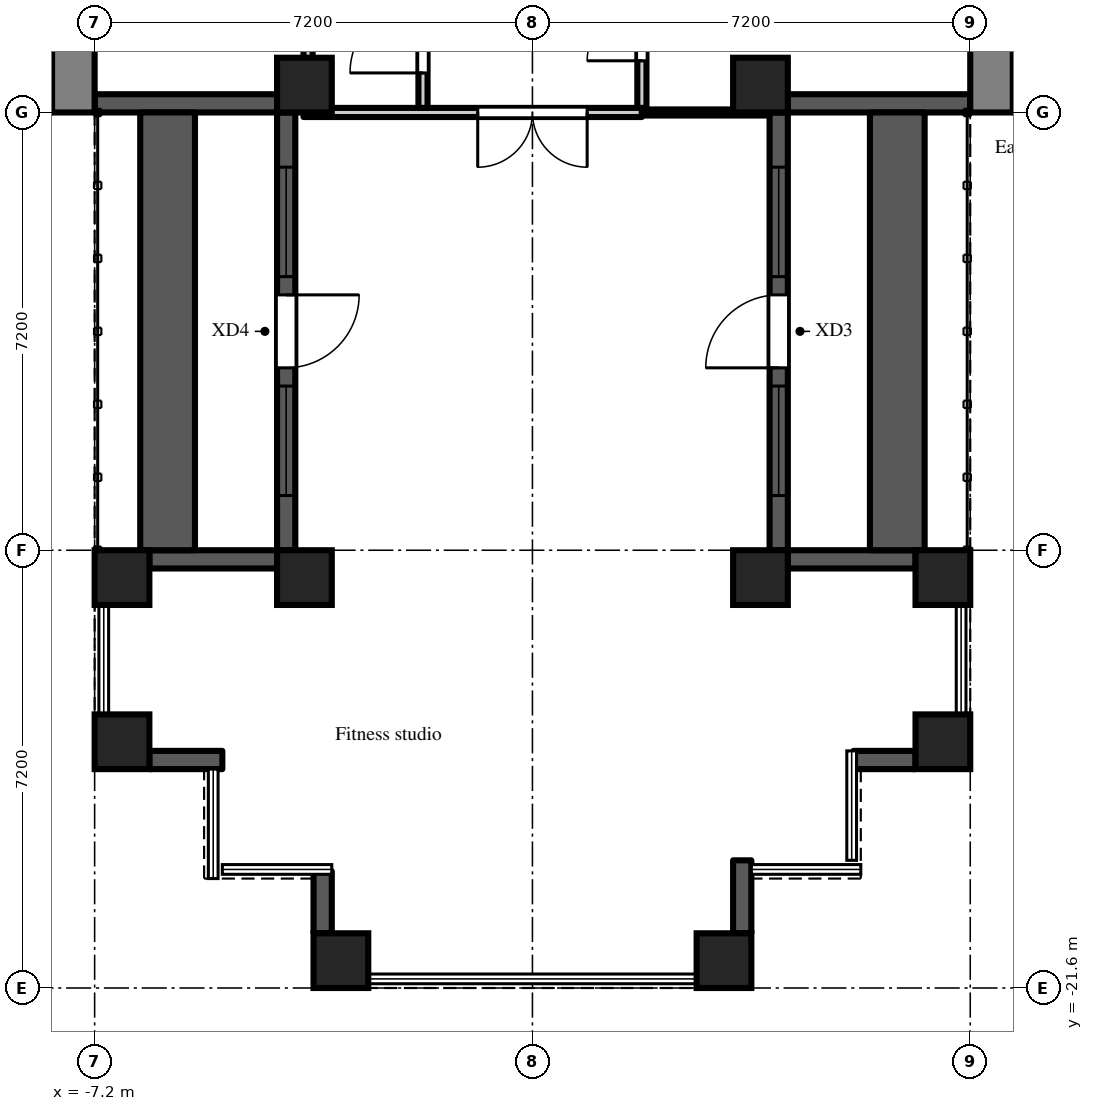
"""IFC4 building model, lengths in metres.
Left out: names, types, materials, properties, quantities, classifications, styles, units other than length and angle.
Written with IfcOpenShell. Run it as: python <this file> out.ifc"""

import sys

from ifc_helpers import new_model, si_unit, direction, frame, frame_2d, origin, origin_2d, place, context, subcontext, project, spatial, rectangle, extrude, element, fill, save


model = new_model("IFC4")
c1 = context("Model", 3, precision=1e-05, world=origin(), true_north=direction((0.0, 1.0)))
c2 = subcontext(c1, "Body", "Model", "MODEL_VIEW")
j1 = project(units=[si_unit("LENGTHUNIT", "METRE"), si_unit("PLANEANGLEUNIT", "RADIAN")], contexts=[c1])
p1 = place(None, origin())
s1 = spatial("IfcSite", under=j1, at=p1, CompositionType="ELEMENT")
p2 = place(p1, origin())
s2 = spatial("IfcBuilding", under=s1, at=p2, CompositionType="ELEMENT")
p3 = place(p2, frame((0.0, 0.0, 166.5)))
s3 = spatial("IfcBuildingStorey", under=s2, at=p3, CompositionType="ELEMENT", Elevation=166.5)
for number, where, z_axis, x_axis in (
    (1, (-6.75, -17.55, 0.0), (0.0, 0.0, 1.0), (1.0, 0.0, 0.0)),
    (2, (-6.75, -14.85, 0.0), (0.0, 0.0, 1.0), (1.0, 0.0, 0.0)),
    (3, (-3.75, -14.85, 0.0), (0.0, 0.0, 1.0), (1.0, 0.0, 0.0)),
    (4, (-3.75, -6.75, 0.0), (0.0, 0.0, 1.0), (1.0, 0.0, 0.0)),
    (5, (-3.15, -21.15, 0.0), (0.0, 0.0, 1.0), (1.0, 0.0, 0.0)),
    (6, (3.15, -21.15, 0.0), (0.0, 0.0, 1.0), (1.0, 0.0, 0.0)),
    (7, (3.75, -14.85, 0.0), (0.0, 0.0, 1.0), (1.0, 0.0, 0.0)),
    (8, (3.75, -6.75, 0.0), (0.0, 0.0, 1.0), (1.0, 0.0, 0.0)),
    (9, (6.75, -17.55, 0.0), (0.0, 0.0, 1.0), (1.0, 0.0, 0.0)),
    (10, (6.75, -14.85, 0.0), (0.0, 0.0, 1.0), (1.0, 0.0, 0.0)),
):
    element("IfcColumn", number, at=place(p3, frame(where, z_axis=z_axis, x_axis=x_axis)), inside=s3, PredefinedType="COLUMN", context=c2, shape_type="SweptSolid", body=[
        extrude(rectangle(XDim=0.9, YDim=0.9, at=origin_2d()), origin(), (0.0, 0.0, 1.0), 4.2),
    ])
p4 = place(p3, frame((-7.2, -7.05, 0.0), z_axis=(0.0, 0.0, 1.0), x_axis=(1.0, 0.0, 0.0)))
e11 = element("IfcWall", 11, at=p4, inside=s3, PredefinedType="SOLIDWALL", context=c2, shape_type="SweptSolid", body=[
    extrude(rectangle(XDim=3.0, YDim=0.3, at=frame_2d((1.5, 0.0))), origin(), (0.0, 0.0, 1.0), 3.4),
])
p5 = place(p3, frame((-4.05, -7.2, 0.0), z_axis=(0.0, 0.0, 1.0), x_axis=(0.0, -1.0, 0.0)))
e12 = element("IfcWall", 12, at=p5, inside=s3, PredefinedType="SOLIDWALL", context=c2, shape_type="SweptSolid", body=[
    extrude(rectangle(XDim=7.2, YDim=0.3, at=frame_2d((3.6, 0.0))), origin(), (0.0, 0.0, 1.0), 3.4),
])
p6 = place(p5, frame((3.0, 0.0, 0.0)))
e13 = element("IfcOpeningElement", 13, at=p6, cuts=e12, PredefinedType="OPENING", context=c2, shape_type="SweptSolid", body=[
    extrude(rectangle(XDim=1.2, YDim=2.05, at=frame_2d((0.6, 1.025))), frame((0.0, 0.16, 0.0), z_axis=(0.0, -1.0, 0.0), x_axis=(1.0, 0.0, 0.0)), (0.0, 0.0, 1.0), 0.32),
])
p7 = place(p5, frame((0.9, 0.0, 0.2)))
e14 = element("IfcOpeningElement", 14, at=p7, cuts=e12, PredefinedType="OPENING", context=c2, shape_type="SweptSolid", body=[
    extrude(rectangle(XDim=1.8, YDim=1.85, at=frame_2d((0.9, 0.925))), frame((0.0, 0.16, 0.0), z_axis=(0.0, -1.0, 0.0), x_axis=(1.0, 0.0, 0.0)), (0.0, 0.0, 1.0), 0.32),
])
p8 = place(p5, frame((4.5, 0.0, 0.2)))
e15 = element("IfcOpeningElement", 15, at=p8, cuts=e12, PredefinedType="OPENING", context=c2, shape_type="SweptSolid", body=[
    extrude(rectangle(XDim=1.8, YDim=1.85, at=frame_2d((0.9, 0.925))), frame((0.0, 0.16, 0.0), z_axis=(0.0, -1.0, 0.0), x_axis=(1.0, 0.0, 0.0)), (0.0, 0.0, 1.0), 0.32),
])
p9 = place(p3, frame((-4.2, -14.55, 0.0), z_axis=(0.0, 0.0, 1.0), x_axis=(-1.0, 0.0, 0.0)))
e16 = element("IfcWall", 16, at=p9, inside=s3, PredefinedType="SOLIDWALL", context=c2, shape_type="SweptSolid", body=[
    extrude(rectangle(XDim=2.1, YDim=0.3, at=frame_2d((1.05, 0.0))), origin(), (0.0, 0.0, 1.0), 3.4),
])
p10 = place(p3, frame((-6.3, -17.85, 0.0), z_axis=(0.0, 0.0, 1.0), x_axis=(1.0, 0.0, 0.0)))
e17 = element("IfcWall", 17, at=p10, inside=s3, PredefinedType="SOLIDWALL", context=c2, shape_type="SweptSolid", body=[
    extrude(rectangle(XDim=1.2, YDim=0.3, at=frame_2d((0.6, 0.0))), origin(), (0.0, 0.0, 1.0), 3.8),
])
p11 = place(p3, frame((-3.45, -19.68, 0.0), z_axis=(0.0, 0.0, 1.0), x_axis=(0.0, -1.0, 0.0)))
e18 = element("IfcWall", 18, at=p11, inside=s3, PredefinedType="SOLIDWALL", context=c2, shape_type="SweptSolid", body=[
    extrude(rectangle(XDim=1.02, YDim=0.3, at=frame_2d((0.51, 0.0))), origin(), (0.0, 0.0, 1.0), 3.8),
])
p12 = place(p3, frame((3.45, -20.7, 0.0), z_axis=(0.0, 0.0, 1.0), x_axis=(0.0, 1.0, 0.0)))
e19 = element("IfcWall", 19, at=p12, inside=s3, PredefinedType="SOLIDWALL", context=c2, shape_type="SweptSolid", body=[
    extrude(rectangle(XDim=1.2, YDim=0.3, at=frame_2d((0.6, 0.0))), origin(), (0.0, 0.0, 1.0), 3.8),
])
p13 = place(p3, frame((5.28, -17.85, 0.0), z_axis=(0.0, 0.0, 1.0), x_axis=(1.0, 0.0, 0.0)))
e20 = element("IfcWall", 20, at=p13, inside=s3, PredefinedType="SOLIDWALL", context=c2, shape_type="SweptSolid", body=[
    extrude(rectangle(XDim=1.02, YDim=0.3, at=frame_2d((0.51, 0.0))), origin(), (0.0, 0.0, 1.0), 3.8),
])
p14 = place(p3, frame((6.3, -14.55, 0.0), z_axis=(0.0, 0.0, 1.0), x_axis=(-1.0, 0.0, 0.0)))
e21 = element("IfcWall", 21, at=p14, inside=s3, PredefinedType="SOLIDWALL", context=c2, shape_type="SweptSolid", body=[
    extrude(rectangle(XDim=2.1, YDim=0.3, at=frame_2d((1.05, 0.0))), origin(), (0.0, 0.0, 1.0), 3.4),
])
p15 = place(p3, frame((4.05, -14.4, 0.0), z_axis=(0.0, 0.0, 1.0), x_axis=(0.0, 1.0, 0.0)))
e22 = element("IfcWall", 22, at=p15, inside=s3, PredefinedType="SOLIDWALL", context=c2, shape_type="SweptSolid", body=[
    extrude(rectangle(XDim=7.2, YDim=0.3, at=frame_2d((3.6, 0.0))), origin(), (0.0, 0.0, 1.0), 3.4),
])
p16 = place(p15, frame((3.0, 0.0, 0.0)))
e23 = element("IfcOpeningElement", 23, at=p16, cuts=e22, PredefinedType="OPENING", context=c2, shape_type="SweptSolid", body=[
    extrude(rectangle(XDim=1.2, YDim=2.05, at=frame_2d((0.6, 1.025))), frame((0.0, 0.16, 0.0), z_axis=(0.0, -1.0, 0.0), x_axis=(1.0, 0.0, 0.0)), (0.0, 0.0, 1.0), 0.32),
])
p17 = place(p15, frame((0.9, 0.0, 0.2)))
e24 = element("IfcOpeningElement", 24, at=p17, cuts=e22, PredefinedType="OPENING", context=c2, shape_type="SweptSolid", body=[
    extrude(rectangle(XDim=1.8, YDim=1.85, at=frame_2d((0.9, 0.925))), frame((0.0, 0.16, 0.0), z_axis=(0.0, -1.0, 0.0), x_axis=(1.0, 0.0, 0.0)), (0.0, 0.0, 1.0), 0.32),
])
p18 = place(p15, frame((4.5, 0.0, 0.2)))
e25 = element("IfcOpeningElement", 25, at=p18, cuts=e22, PredefinedType="OPENING", context=c2, shape_type="SweptSolid", body=[
    extrude(rectangle(XDim=1.8, YDim=1.85, at=frame_2d((0.9, 0.925))), frame((0.0, 0.16, 0.0), z_axis=(0.0, -1.0, 0.0), x_axis=(1.0, 0.0, 0.0)), (0.0, 0.0, 1.0), 0.32),
])
p19 = place(p3, frame((4.2, -7.05, 0.0), z_axis=(0.0, 0.0, 1.0), x_axis=(1.0, 0.0, 0.0)))
e26 = element("IfcWall", 26, at=p19, inside=s3, PredefinedType="SOLIDWALL", context=c2, shape_type="SweptSolid", body=[
    extrude(rectangle(XDim=3.0, YDim=0.3, at=frame_2d((1.5, 0.0))), origin(), (0.0, 0.0, 1.0), 3.4),
])
for number, where, z_axis, x_axis in (
    (27, (6.0, -14.4, 0.0), (0.0, 0.0, 1.0), (0.0, 1.0, 0.0)),
    (28, (-6.0, -14.4, 0.0), (0.0, 0.0, 1.0), (0.0, 1.0, 0.0)),
):
    element("IfcWall", number, at=place(p3, frame(where, z_axis=z_axis, x_axis=x_axis)), inside=s3, PredefinedType="PARAPET", context=c2, shape_type="SweptSolid", body=[
        extrude(rectangle(XDim=7.2, YDim=0.9, at=frame_2d((3.6, 0.0))), origin(), (0.0, 0.0, 1.0), 0.8),
    ])
p20 = place(p3, frame((7.55, -7.2, 0.0), z_axis=(0.0, 0.0, 1.0), x_axis=(0.0, 1.0, 0.0)))
e29 = element("IfcWall", 29, at=p20, inside=s3, PredefinedType="SHEAR", context=c2, shape_type="SweptSolid", body=[
    extrude(rectangle(XDim=14.4, YDim=0.7, at=frame_2d((7.2, 0.0))), origin(), (0.0, 0.0, 1.0), 3.8),
])
p21 = place(p20, frame((6.0, 0.0, 0.0)))
e30 = element("IfcOpeningElement", 30, at=p21, cuts=e29, PredefinedType="OPENING", context=c2, shape_type="SweptSolid", body=[
    extrude(rectangle(XDim=2.4, YDim=2.2, at=frame_2d((1.2, 1.1))), frame((0.0, 0.36, 0.0), z_axis=(0.0, -1.0, 0.0), x_axis=(1.0, 0.0, 0.0)), (0.0, 0.0, 1.0), 0.72),
])
p22 = place(p3, frame((-7.55, -7.2, 0.0), z_axis=(0.0, 0.0, 1.0), x_axis=(0.0, 1.0, 0.0)))
e31 = element("IfcWall", 31, at=p22, inside=s3, PredefinedType="SHEAR", context=c2, shape_type="SweptSolid", body=[
    extrude(rectangle(XDim=14.4, YDim=0.7, at=frame_2d((7.2, 0.0))), origin(), (0.0, 0.0, 1.0), 3.8),
])
p23 = place(p22, frame((6.0, 0.0, 0.0)))
e32 = element("IfcOpeningElement", 32, at=p23, cuts=e31, PredefinedType="OPENING", context=c2, shape_type="SweptSolid", body=[
    extrude(rectangle(XDim=2.4, YDim=2.2, at=frame_2d((1.2, 1.1))), frame((0.0, 0.36, 0.0), z_axis=(0.0, -1.0, 0.0), x_axis=(1.0, 0.0, 0.0)), (0.0, 0.0, 1.0), 0.72),
])
p24 = place(p3, frame((-3.69, -7.125, 0.0), z_axis=(0.0, 0.0, 1.0), x_axis=(0.0, 1.0, 0.0)))
e33 = element("IfcWall", 33, at=p24, inside=s3, PredefinedType="PARTITIONING", context=c2, shape_type="SweptSolid", body=[
    extrude(rectangle(XDim=5.25, YDim=0.15, at=frame_2d((2.625, 0.0))), origin(), (0.0, 0.0, 1.0), 3.8),
])
p25 = place(p3, frame((-3.765, -7.2, 0.0), z_axis=(0.0, 0.0, 1.0), x_axis=(1.0, 0.0, 0.0)))
e34 = element("IfcWall", 34, at=p25, inside=s3, PredefinedType="PARTITIONING", context=c2, shape_type="SweptSolid", body=[
    extrude(rectangle(XDim=5.565, YDim=0.15, at=frame_2d((2.782, 0.0))), origin(), (0.0, 0.0, 1.0), 3.8),
])
p26 = place(p25, frame((2.865, 0.0, 0.0)))
e35 = element("IfcOpeningElement", 35, at=p26, cuts=e34, PredefinedType="OPENING", context=c2, shape_type="SweptSolid", body=[
    extrude(rectangle(XDim=1.8, YDim=2.1, at=frame_2d((0.9, 1.05))), frame((0.0, 0.085, 0.0), z_axis=(0.0, -1.0, 0.0), x_axis=(1.0, 0.0, 0.0)), (0.0, 0.0, 1.0), 0.17),
])
p27 = place(p3, frame((-1.8, -7.125, 0.0), z_axis=(0.0, 0.0, 1.0), x_axis=(0.0, 1.0, 0.0)))
e36 = element("IfcWall", 36, at=p27, inside=s3, PredefinedType="PARTITIONING", context=c2, shape_type="SweptSolid", body=[
    extrude(rectangle(XDim=5.4, YDim=0.15, at=frame_2d((2.7, 0.0))), origin(), (0.0, 0.0, 1.0), 3.8),
])
p28 = place(p27, frame((0.575, 0.0, 0.0)))
e37 = element("IfcOpeningElement", 37, at=p28, cuts=e36, PredefinedType="OPENING", context=c2, shape_type="SweptSolid", body=[
    extrude(rectangle(XDim=1.2, YDim=2.1, at=frame_2d((0.6, 1.05))), frame((0.0, 0.085, 0.0), z_axis=(0.0, -1.0, 0.0), x_axis=(1.0, 0.0, 0.0)), (0.0, 0.0, 1.0), 0.17),
])
p29 = place(p27, frame((3.12, 0.0, 0.0)))
e38 = element("IfcOpeningElement", 38, at=p29, cuts=e36, PredefinedType="OPENING", context=c2, shape_type="SweptSolid", body=[
    extrude(rectangle(XDim=0.9, YDim=2.1, at=frame_2d((0.45, 1.05))), frame((0.0, 0.085, 0.0), z_axis=(0.0, -1.0, 0.0), x_axis=(1.0, 0.0, 0.0)), (0.0, 0.0, 1.0), 0.17),
])
p30 = place(p3, frame((1.8, -7.125, 0.0), z_axis=(0.0, 0.0, 1.0), x_axis=(0.0, 1.0, 0.0)))
e39 = element("IfcWall", 39, at=p30, inside=s3, PredefinedType="PARTITIONING", context=c2, shape_type="SweptSolid", body=[
    extrude(rectangle(XDim=5.4, YDim=0.15, at=frame_2d((2.7, 0.0))), origin(), (0.0, 0.0, 1.0), 3.8),
])
p31 = place(p30, frame((0.775, 0.0, 0.0)))
e40 = element("IfcOpeningElement", 40, at=p31, cuts=e39, PredefinedType="OPENING", context=c2, shape_type="SweptSolid", body=[
    extrude(rectangle(XDim=1.8, YDim=2.1, at=frame_2d((0.9, 1.05))), frame((0.0, 0.085, 0.0), z_axis=(0.0, -1.0, 0.0), x_axis=(1.0, 0.0, 0.0)), (0.0, 0.0, 1.0), 0.17),
])
p32 = place(p3, frame((1.8, -7.2, 0.0), z_axis=(0.0, 0.0, 1.0), x_axis=(1.0, 0.0, 0.0)))
e41 = element("IfcWall", 41, at=p32, inside=s3, PredefinedType="PARTITIONING", context=c2, shape_type="SweptSolid", body=[
    extrude(rectangle(XDim=2.1, YDim=0.1, at=frame_2d((1.05, 0.0))), origin(), (0.0, 0.0, 1.0), 3.8),
])
p33 = place(p6, origin())
e42 = element("IfcDoor", 42, at=p33, inside=s3, OperationType="SINGLE_SWING_LEFT", PredefinedType="DOOR", context=c2, shape_type="SweptSolid", body=[
    extrude(rectangle(XDim=1.2, YDim=2.05, at=frame_2d((0.6, 1.025))), frame((0.0, 0.025, 0.0), z_axis=(0.0, -1.0, 0.0), x_axis=(1.0, 0.0, 0.0)), (0.0, 0.0, 1.0), 0.05),
])
fill(e13, e42)
p34 = place(p7, origin())
e43 = element("IfcWindow", 43, at=p34, inside=s3, PartitioningType="SINGLE_PANEL", PredefinedType="WINDOW", context=c2, shape_type="SweptSolid", body=[
    extrude(rectangle(XDim=1.8, YDim=1.85, at=frame_2d((0.9, 0.925))), frame((0.0, 0.03, 0.0), z_axis=(0.0, -1.0, 0.0), x_axis=(1.0, 0.0, 0.0)), (0.0, 0.0, 1.0), 0.06),
])
fill(e14, e43)
p35 = place(p8, origin())
e44 = element("IfcWindow", 44, at=p35, inside=s3, PartitioningType="SINGLE_PANEL", PredefinedType="WINDOW", context=c2, shape_type="SweptSolid", body=[
    extrude(rectangle(XDim=1.8, YDim=1.85, at=frame_2d((0.9, 0.925))), frame((0.0, 0.03, 0.0), z_axis=(0.0, -1.0, 0.0), x_axis=(1.0, 0.0, 0.0)), (0.0, 0.0, 1.0), 0.06),
])
fill(e15, e44)
p36 = place(p16, origin())
e45 = element("IfcDoor", 45, at=p36, inside=s3, OperationType="SINGLE_SWING_LEFT", PredefinedType="DOOR", context=c2, shape_type="SweptSolid", body=[
    extrude(rectangle(XDim=1.2, YDim=2.05, at=frame_2d((0.6, 1.025))), frame((0.0, 0.025, 0.0), z_axis=(0.0, -1.0, 0.0), x_axis=(1.0, 0.0, 0.0)), (0.0, 0.0, 1.0), 0.05),
])
fill(e23, e45)
p37 = place(p17, origin())
e46 = element("IfcWindow", 46, at=p37, inside=s3, PartitioningType="SINGLE_PANEL", PredefinedType="WINDOW", context=c2, shape_type="SweptSolid", body=[
    extrude(rectangle(XDim=1.8, YDim=1.85, at=frame_2d((0.9, 0.925))), frame((0.0, 0.03, 0.0), z_axis=(0.0, -1.0, 0.0), x_axis=(1.0, 0.0, 0.0)), (0.0, 0.0, 1.0), 0.06),
])
fill(e24, e46)
p38 = place(p18, origin())
e47 = element("IfcWindow", 47, at=p38, inside=s3, PartitioningType="SINGLE_PANEL", PredefinedType="WINDOW", context=c2, shape_type="SweptSolid", body=[
    extrude(rectangle(XDim=1.8, YDim=1.85, at=frame_2d((0.9, 0.925))), frame((0.0, 0.03, 0.0), z_axis=(0.0, -1.0, 0.0), x_axis=(1.0, 0.0, 0.0)), (0.0, 0.0, 1.0), 0.06),
])
fill(e25, e47)
p39 = place(p28, origin())
e48 = element("IfcDoor", 48, at=p39, inside=s3, OperationType="SINGLE_SWING_LEFT", PredefinedType="DOOR", context=c2, shape_type="SweptSolid", body=[
    extrude(rectangle(XDim=1.2, YDim=2.1, at=frame_2d((0.6, 1.05))), frame((0.0, 0.025, 0.0), z_axis=(0.0, -1.0, 0.0), x_axis=(1.0, 0.0, 0.0)), (0.0, 0.0, 1.0), 0.05),
])
fill(e37, e48)
p40 = place(p31, origin())
e49 = element("IfcDoor", 49, at=p40, inside=s3, OperationType="DOUBLE_DOOR_DOUBLE_SWING", PredefinedType="DOOR", context=c2, shape_type="SweptSolid", body=[
    extrude(rectangle(XDim=1.8, YDim=2.1, at=frame_2d((0.9, 1.05))), frame((0.0, 0.025, 0.0), z_axis=(0.0, -1.0, 0.0), x_axis=(1.0, 0.0, 0.0)), (0.0, 0.0, 1.0), 0.05),
])
fill(e40, e49)
p41 = place(p26, frame((1.8, 0.0, 0.0), z_axis=(0.0, 0.0, 1.0), x_axis=(-1.0, 0.0, 0.0)))
e50 = element("IfcDoor", 50, at=p41, inside=s3, OperationType="DOUBLE_DOOR_DOUBLE_SWING", PredefinedType="DOOR", context=c2, shape_type="SweptSolid", body=[
    extrude(rectangle(XDim=1.8, YDim=2.1, at=frame_2d((0.9, 1.05))), frame((0.0, 0.025, 0.0), z_axis=(0.0, -1.0, 0.0), x_axis=(1.0, 0.0, 0.0)), (0.0, 0.0, 1.0), 0.05),
])
fill(e35, e50)
save(model, sys.argv[1])
